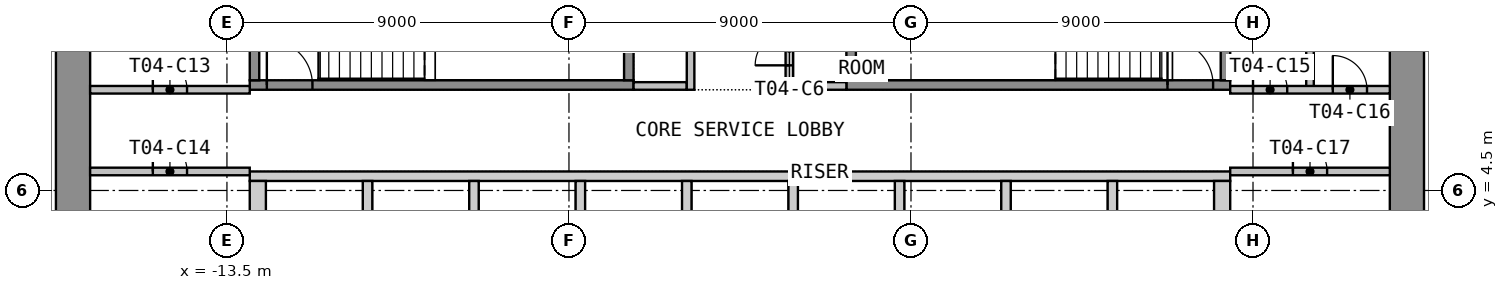
"""IFC4 building model, lengths in metres.
Left out: names, types, materials, properties, quantities, classifications, styles, units other than length and angle.
Written with IfcOpenShell. Run it as: python <this file> out.ifc"""

import sys

from ifc_helpers import new_model, si_unit, direction, frame, frame_2d, origin, place, context, subcontext, project, spatial, polyline, rectangle, outline, extrude, element, fill, save


model = new_model("IFC4")
c1 = context("Model", 3, precision=1e-05, world=origin(), true_north=direction((0.0, 1.0)))
c2 = subcontext(c1, "Body", "Model", "MODEL_VIEW")
j1 = project(units=[si_unit("LENGTHUNIT", "METRE"), si_unit("PLANEANGLEUNIT", "RADIAN")], contexts=[c1])
p1 = place(None, origin())
s1 = spatial("IfcSite", under=j1, at=p1, CompositionType="ELEMENT")
p2 = place(p1, origin())
s2 = spatial("IfcBuilding", under=s1, at=p2, CompositionType="ELEMENT")
p3 = place(p2, frame((0.0, 0.0, 65.1)))
s3 = spatial("IfcBuildingStorey", under=s2, at=p3, CompositionType="ELEMENT", Elevation=65.1)
p4 = place(p3, frame((-17.55, -12.6, 0.0), z_axis=(0.0, 0.0, 1.0), x_axis=(0.0, 1.0, 0.0)))
e1 = element("IfcWall", 1, at=p4, inside=s3, PredefinedType="SHEAR", context=c2, shape_type="SweptSolid", body=[
    extrude(rectangle(XDim=25.2, YDim=0.9, at=frame_2d((12.6, 0.0))), origin(), (0.0, 0.0, 1.0), 3.525),
])
p5 = place(p4, frame((11.4, 0.0, 0.0)))
e2 = element("IfcOpeningElement", 2, at=p5, cuts=e1, PredefinedType="OPENING", context=c2, shape_type="SweptSolid", body=[
    extrude(rectangle(XDim=2.4, YDim=2.1, at=frame_2d((1.2, 1.05))), frame((0.0, 0.46, 0.0), z_axis=(0.0, -1.0, 0.0), x_axis=(1.0, 0.0, 0.0)), (0.0, 0.0, 1.0), 0.92),
])
p6 = place(p3, frame((17.55, -12.6, 0.0), z_axis=(0.0, 0.0, 1.0), x_axis=(0.0, 1.0, 0.0)))
e3 = element("IfcWall", 3, at=p6, inside=s3, PredefinedType="SHEAR", context=c2, shape_type="SweptSolid", body=[
    extrude(rectangle(XDim=25.2, YDim=0.9, at=frame_2d((12.6, 0.0))), origin(), (0.0, 0.0, 1.0), 3.525),
])
p7 = place(p6, frame((11.4, 0.0, 0.0)))
e4 = element("IfcOpeningElement", 4, at=p7, cuts=e3, PredefinedType="OPENING", context=c2, shape_type="SweptSolid", body=[
    extrude(rectangle(XDim=2.4, YDim=2.1, at=frame_2d((1.2, 1.05))), frame((0.0, 0.46, 0.0), z_axis=(0.0, -1.0, 0.0), x_axis=(1.0, 0.0, 0.0)), (0.0, 0.0, 1.0), 0.92),
])
p8 = place(p3, origin())
e5 = element("IfcWall", 5, at=p8, inside=s3, PredefinedType="SHEAR", context=c2, shape_type="SweptSolid", body=[
    extrude(outline(polyline([(-12.9, 4.75), (12.9, 4.75), (12.9, 5.0), (-12.9, 5.0), (-12.9, 4.75)])), origin(), (0.0, 0.0, 1.0), 3.525),
])
p9 = place(p3, origin())
e6 = element("IfcWall", 6, at=p9, inside=s3, PredefinedType="SHEAR", context=c2, shape_type="SweptSolid", body=[
    extrude(outline(polyline([(-12.9, 2.05), (-12.475, 2.05), (-12.475, 4.75), (-12.9, 4.75), (-12.9, 2.05)])), origin(), (0.0, 0.0, 1.0), 3.525),
])
p10 = place(p3, origin())
e7 = element("IfcWall", 7, at=p10, inside=s3, PredefinedType="SHEAR", context=c2, shape_type="SweptSolid", body=[
    extrude(outline(polyline([(-9.925, 2.05), (-9.675, 2.05), (-9.675, 4.75), (-9.925, 4.75), (-9.925, 2.05)])), origin(), (0.0, 0.0, 1.0), 3.525),
])
p11 = place(p3, origin())
e8 = element("IfcWall", 8, at=p11, inside=s3, PredefinedType="SHEAR", context=c2, shape_type="SweptSolid", body=[
    extrude(outline(polyline([(-7.125, 2.05), (-6.875, 2.05), (-6.875, 4.75), (-7.125, 4.75), (-7.125, 2.05)])), origin(), (0.0, 0.0, 1.0), 3.525),
])
p12 = place(p3, origin())
e9 = element("IfcWall", 9, at=p12, inside=s3, PredefinedType="SHEAR", context=c2, shape_type="SweptSolid", body=[
    extrude(outline(polyline([(-4.325, 2.05), (-4.075, 2.05), (-4.075, 4.75), (-4.325, 4.75), (-4.325, 2.05)])), origin(), (0.0, 0.0, 1.0), 3.525),
])
p13 = place(p3, origin())
e10 = element("IfcWall", 10, at=p13, inside=s3, PredefinedType="SHEAR", context=c2, shape_type="SweptSolid", body=[
    extrude(outline(polyline([(-1.525, 2.05), (-1.275, 2.05), (-1.275, 4.75), (-1.525, 4.75), (-1.525, 2.05)])), origin(), (0.0, 0.0, 1.0), 3.525),
])
p14 = place(p3, origin())
e11 = element("IfcWall", 11, at=p14, inside=s3, PredefinedType="SHEAR", context=c2, shape_type="SweptSolid", body=[
    extrude(outline(polyline([(1.275, 2.05), (1.525, 2.05), (1.525, 4.75), (1.275, 4.75), (1.275, 2.05)])), origin(), (0.0, 0.0, 1.0), 3.525),
])
p15 = place(p3, origin())
e12 = element("IfcWall", 12, at=p15, inside=s3, PredefinedType="SHEAR", context=c2, shape_type="SweptSolid", body=[
    extrude(outline(polyline([(4.075, 2.05), (4.325, 2.05), (4.325, 4.75), (4.075, 4.75), (4.075, 2.05)])), origin(), (0.0, 0.0, 1.0), 3.525),
])
p16 = place(p3, origin())
e13 = element("IfcWall", 13, at=p16, inside=s3, PredefinedType="SHEAR", context=c2, shape_type="SweptSolid", body=[
    extrude(outline(polyline([(6.875, 2.05), (7.125, 2.05), (7.125, 4.75), (6.875, 4.75), (6.875, 2.05)])), origin(), (0.0, 0.0, 1.0), 3.525),
])
p17 = place(p3, origin())
e14 = element("IfcWall", 14, at=p17, inside=s3, PredefinedType="SHEAR", context=c2, shape_type="SweptSolid", body=[
    extrude(outline(polyline([(9.675, 2.05), (9.925, 2.05), (9.925, 4.75), (9.675, 4.75), (9.675, 2.05)])), origin(), (0.0, 0.0, 1.0), 3.525),
])
p18 = place(p3, origin())
e15 = element("IfcWall", 15, at=p18, inside=s3, PredefinedType="SHEAR", context=c2, shape_type="SweptSolid", body=[
    extrude(outline(polyline([(12.475, 2.05), (12.9, 2.05), (12.9, 4.75), (12.475, 4.75), (12.475, 2.05)])), origin(), (0.0, 0.0, 1.0), 3.525),
])
p19 = place(p3, frame((-12.9, 7.275, 0.0), z_axis=(0.0, 0.0, 1.0), x_axis=(1.0, 0.0, 0.0)))
e16 = element("IfcWall", 16, at=p19, inside=s3, PredefinedType="SHEAR", context=c2, shape_type="SweptSolid", body=[
    extrude(rectangle(XDim=10.1, YDim=0.25, at=frame_2d((5.05, 0.0))), origin(), (0.0, 0.0, 1.0), 3.525),
])
p20 = place(p19, frame((0.45, 0.0, 0.0)))
e17 = element("IfcOpeningElement", 17, at=p20, cuts=e16, PredefinedType="OPENING", context=c2, shape_type="SweptSolid", body=[
    extrude(rectangle(XDim=1.2, YDim=2.1, at=frame_2d((0.6, 1.05))), frame((0.0, 0.135, 0.0), z_axis=(0.0, -1.0, 0.0), x_axis=(1.0, 0.0, 0.0)), (0.0, 0.0, 1.0), 0.27),
])
for number, where, z_axis, x_axis in (
    (18, (-12.775, 7.4, 0.0), (0.0, 0.0, 1.0), (0.0, 1.0, 0.0)),
    (19, (-2.925, 7.4, 0.0), (0.0, 0.0, 1.0), (0.0, 1.0, 0.0)),
):
    element("IfcWall", number, at=place(p3, frame(where, z_axis=z_axis, x_axis=x_axis)), inside=s3, PredefinedType="SHEAR", context=c2, shape_type="SweptSolid", body=[
        extrude(rectangle(XDim=3.25, YDim=0.25, at=frame_2d((1.625, 0.0))), origin(), (0.0, 0.0, 1.0), 3.525),
    ])
p21 = place(p3, frame((2.8, 7.275, 0.0), z_axis=(0.0, 0.0, 1.0), x_axis=(1.0, 0.0, 0.0)))
e20 = element("IfcWall", 20, at=p21, inside=s3, PredefinedType="SHEAR", context=c2, shape_type="SweptSolid", body=[
    extrude(rectangle(XDim=10.1, YDim=0.25, at=frame_2d((5.05, 0.0))), origin(), (0.0, 0.0, 1.0), 3.525),
])
p22 = place(p21, frame((8.45, 0.0, 0.0)))
e21 = element("IfcOpeningElement", 21, at=p22, cuts=e20, PredefinedType="OPENING", context=c2, shape_type="SweptSolid", body=[
    extrude(rectangle(XDim=1.2, YDim=2.1, at=frame_2d((0.6, 1.05))), frame((0.0, 0.135, 0.0), z_axis=(0.0, -1.0, 0.0), x_axis=(1.0, 0.0, 0.0)), (0.0, 0.0, 1.0), 0.27),
])
for number, where, z_axis, x_axis in (
    (22, (2.925, 7.4, 0.0), (0.0, 0.0, 1.0), (0.0, 1.0, 0.0)),
    (23, (12.775, 7.4, 0.0), (0.0, 0.0, 1.0), (0.0, 1.0, 0.0)),
):
    element("IfcWall", number, at=place(p3, frame(where, z_axis=z_axis, x_axis=x_axis)), inside=s3, PredefinedType="SHEAR", context=c2, shape_type="SweptSolid", body=[
        extrude(rectangle(XDim=3.25, YDim=0.25, at=frame_2d((1.625, 0.0))), origin(), (0.0, 0.0, 1.0), 3.525),
    ])
for number, where, z_axis, x_axis in (
    (24, (-2.8, 7.25, 0.0), (0.0, 0.0, 1.0), (1.0, 0.0, 0.0)),
    (25, (1.4, 7.25, 0.0), (0.0, 0.0, 1.0), (1.0, 0.0, 0.0)),
):
    element("IfcWall", number, at=place(p3, frame(where, z_axis=z_axis, x_axis=x_axis)), inside=s3, PredefinedType="PARTITIONING", context=c2, shape_type="SweptSolid", body=[
        extrude(rectangle(XDim=1.4, YDim=0.2, at=frame_2d((0.7, 0.0))), origin(), (0.0, 0.0, 1.0), 3.525),
    ])
p23 = place(p3, frame((-1.3, 7.15, 0.0), z_axis=(0.0, 0.0, 1.0), x_axis=(0.0, 1.0, 0.0)))
e26 = element("IfcWall", 26, at=p23, inside=s3, PredefinedType="PARTITIONING", context=c2, shape_type="SweptSolid", body=[
    extrude(rectangle(XDim=5.45, YDim=0.2, at=frame_2d((2.725, 0.0))), origin(), (0.0, 0.0, 1.0), 3.525),
])
p24 = place(p23, frame((2.375, 0.0, 0.0)))
e27 = element("IfcOpeningElement", 27, at=p24, cuts=e26, PredefinedType="OPENING", context=c2, shape_type="SweptSolid", body=[
    extrude(rectangle(XDim=0.9, YDim=2.1, at=frame_2d((0.45, 1.05))), frame((0.0, 0.11, 0.0), z_axis=(0.0, -1.0, 0.0), x_axis=(1.0, 0.0, 0.0)), (0.0, 0.0, 1.0), 0.22),
])
p25 = place(p3, frame((1.3, 7.15, 0.0), z_axis=(0.0, 0.0, 1.0), x_axis=(0.0, 1.0, 0.0)))
e28 = element("IfcWall", 28, at=p25, inside=s3, PredefinedType="PARTITIONING", context=c2, shape_type="SweptSolid", body=[
    extrude(rectangle(XDim=5.45, YDim=0.2, at=frame_2d((2.725, 0.0))), origin(), (0.0, 0.0, 1.0), 3.525),
])
p26 = place(p25, frame((0.643, 0.0, 0.0)))
e29 = element("IfcOpeningElement", 29, at=p26, cuts=e28, PredefinedType="OPENING", context=c2, shape_type="SweptSolid", body=[
    extrude(rectangle(XDim=0.9, YDim=2.1, at=frame_2d((0.45, 1.05))), frame((0.0, 0.11, 0.0), z_axis=(0.0, -1.0, 0.0), x_axis=(1.0, 0.0, 0.0)), (0.0, 0.0, 1.0), 0.22),
])
p27 = place(p25, frame((2.401, 0.0, 0.0)))
e30 = element("IfcOpeningElement", 30, at=p27, cuts=e28, PredefinedType="OPENING", context=c2, shape_type="SweptSolid", body=[
    extrude(rectangle(XDim=0.9, YDim=2.1, at=frame_2d((0.45, 1.05))), frame((0.0, 0.11, 0.0), z_axis=(0.0, -1.0, 0.0), x_axis=(1.0, 0.0, 0.0)), (0.0, 0.0, 1.0), 0.22),
])
p28 = place(p25, frame((4.134, 0.0, 0.0)))
e31 = element("IfcOpeningElement", 31, at=p28, cuts=e28, PredefinedType="OPENING", context=c2, shape_type="SweptSolid", body=[
    extrude(rectangle(XDim=0.9, YDim=2.1, at=frame_2d((0.45, 1.05))), frame((0.0, 0.11, 0.0), z_axis=(0.0, -1.0, 0.0), x_axis=(1.0, 0.0, 0.0)), (0.0, 0.0, 1.0), 0.22),
])
p29 = place(p3, frame((-17.1, 7.15, 0.0), z_axis=(0.0, 0.0, 1.0), x_axis=(1.0, 0.0, 0.0)))
e32 = element("IfcWall", 32, at=p29, inside=s3, PredefinedType="PARTITIONING", context=c2, shape_type="SweptSolid", body=[
    extrude(rectangle(XDim=4.2, YDim=0.2, at=frame_2d((2.1, 0.0))), origin(), (0.0, 0.0, 1.0), 3.525),
])
p30 = place(p29, frame((1.65, 0.0, 0.0)))
e33 = element("IfcOpeningElement", 33, at=p30, cuts=e32, PredefinedType="OPENING", context=c2, shape_type="SweptSolid", body=[
    extrude(rectangle(XDim=0.9, YDim=2.1, at=frame_2d((0.45, 1.05))), frame((0.0, 0.11, 0.0), z_axis=(0.0, -1.0, 0.0), x_axis=(1.0, 0.0, 0.0)), (0.0, 0.0, 1.0), 0.22),
])
p31 = place(p3, frame((-17.1, 5.0, 0.0), z_axis=(0.0, 0.0, 1.0), x_axis=(1.0, 0.0, 0.0)))
e34 = element("IfcWall", 34, at=p31, inside=s3, PredefinedType="PARTITIONING", context=c2, shape_type="SweptSolid", body=[
    extrude(rectangle(XDim=4.2, YDim=0.2, at=frame_2d((2.1, 0.0))), origin(), (0.0, 0.0, 1.0), 3.525),
])
p32 = place(p31, frame((1.65, 0.0, 0.0)))
e35 = element("IfcOpeningElement", 35, at=p32, cuts=e34, PredefinedType="OPENING", context=c2, shape_type="SweptSolid", body=[
    extrude(rectangle(XDim=0.9, YDim=2.1, at=frame_2d((0.45, 1.05))), frame((0.0, 0.11, 0.0), z_axis=(0.0, -1.0, 0.0), x_axis=(1.0, 0.0, 0.0)), (0.0, 0.0, 1.0), 0.22),
])
p33 = place(p3, frame((15.0, 7.15, 0.0), z_axis=(0.0, 0.0, 1.0), x_axis=(0.0, 1.0, 0.0)))
e36 = element("IfcWall", 36, at=p33, inside=s3, PredefinedType="PARTITIONING", context=c2, shape_type="SweptSolid", body=[
    extrude(rectangle(XDim=5.45, YDim=0.2, at=frame_2d((2.725, 0.0))), origin(), (0.0, 0.0, 1.0), 3.525),
])
p34 = place(p3, frame((12.9, 7.15, 0.0), z_axis=(0.0, 0.0, 1.0), x_axis=(1.0, 0.0, 0.0)))
e37 = element("IfcWall", 37, at=p34, inside=s3, PredefinedType="PARTITIONING", context=c2, shape_type="SweptSolid", body=[
    extrude(rectangle(XDim=4.2, YDim=0.2, at=frame_2d((2.1, 0.0))), origin(), (0.0, 0.0, 1.0), 3.525),
])
p35 = place(p34, frame((0.6, 0.0, 0.0)))
e38 = element("IfcOpeningElement", 38, at=p35, cuts=e37, PredefinedType="OPENING", context=c2, shape_type="SweptSolid", body=[
    extrude(rectangle(XDim=0.9, YDim=2.1, at=frame_2d((0.45, 1.05))), frame((0.0, 0.11, 0.0), z_axis=(0.0, -1.0, 0.0), x_axis=(1.0, 0.0, 0.0)), (0.0, 0.0, 1.0), 0.22),
])
p36 = place(p34, frame((2.7, 0.0, 0.0)))
e39 = element("IfcOpeningElement", 39, at=p36, cuts=e37, PredefinedType="OPENING", context=c2, shape_type="SweptSolid", body=[
    extrude(rectangle(XDim=0.9, YDim=2.1, at=frame_2d((0.45, 1.05))), frame((0.0, 0.11, 0.0), z_axis=(0.0, -1.0, 0.0), x_axis=(1.0, 0.0, 0.0)), (0.0, 0.0, 1.0), 0.22),
])
p37 = place(p3, frame((12.9, 5.0, 0.0), z_axis=(0.0, 0.0, 1.0), x_axis=(1.0, 0.0, 0.0)))
e40 = element("IfcWall", 40, at=p37, inside=s3, PredefinedType="PARTITIONING", context=c2, shape_type="SweptSolid", body=[
    extrude(rectangle(XDim=4.2, YDim=0.2, at=frame_2d((2.1, 0.0))), origin(), (0.0, 0.0, 1.0), 3.525),
])
p38 = place(p37, frame((1.65, 0.0, 0.0)))
e41 = element("IfcOpeningElement", 41, at=p38, cuts=e40, PredefinedType="OPENING", context=c2, shape_type="SweptSolid", body=[
    extrude(rectangle(XDim=0.9, YDim=2.1, at=frame_2d((0.45, 1.05))), frame((0.0, 0.11, 0.0), z_axis=(0.0, -1.0, 0.0), x_axis=(1.0, 0.0, 0.0)), (0.0, 0.0, 1.0), 0.22),
])
p39 = place(p20, origin())
e42 = element("IfcDoor", 42, at=p39, inside=s3, OperationType="SINGLE_SWING_LEFT", PredefinedType="DOOR", context=c2, shape_type="SweptSolid", body=[
    extrude(rectangle(XDim=1.2, YDim=2.1, at=frame_2d((0.6, 1.05))), frame((0.0, 0.025, 0.0), z_axis=(0.0, -1.0, 0.0), x_axis=(1.0, 0.0, 0.0)), (0.0, 0.0, 1.0), 0.05),
])
fill(e17, e42)
p40 = place(p22, origin())
e43 = element("IfcDoor", 43, at=p40, inside=s3, OperationType="SINGLE_SWING_LEFT", PredefinedType="DOOR", context=c2, shape_type="SweptSolid", body=[
    extrude(rectangle(XDim=1.2, YDim=2.1, at=frame_2d((0.6, 1.05))), frame((0.0, 0.025, 0.0), z_axis=(0.0, -1.0, 0.0), x_axis=(1.0, 0.0, 0.0)), (0.0, 0.0, 1.0), 0.05),
])
fill(e21, e43)
p41 = place(p26, origin())
e44 = element("IfcDoor", 44, at=p41, inside=s3, OperationType="SINGLE_SWING_LEFT", PredefinedType="DOOR", context=c2, shape_type="SweptSolid", body=[
    extrude(rectangle(XDim=0.9, YDim=2.1, at=frame_2d((0.45, 1.05))), frame((0.0, 0.025, 0.0), z_axis=(0.0, -1.0, 0.0), x_axis=(1.0, 0.0, 0.0)), (0.0, 0.0, 1.0), 0.05),
])
fill(e29, e44)
p42 = place(p30, origin())
e45 = element("IfcDoor", 45, at=p42, inside=s3, OperationType="SINGLE_SWING_LEFT", PredefinedType="DOOR", context=c2, shape_type="SweptSolid", body=[
    extrude(rectangle(XDim=0.9, YDim=2.1, at=frame_2d((0.45, 1.05))), frame((0.0, 0.025, 0.0), z_axis=(0.0, -1.0, 0.0), x_axis=(1.0, 0.0, 0.0)), (0.0, 0.0, 1.0), 0.05),
])
fill(e33, e45)
p43 = place(p32, origin())
e46 = element("IfcDoor", 46, at=p43, inside=s3, OperationType="SINGLE_SWING_LEFT", PredefinedType="DOOR", context=c2, shape_type="SweptSolid", body=[
    extrude(rectangle(XDim=0.9, YDim=2.1, at=frame_2d((0.45, 1.05))), frame((0.0, 0.025, 0.0), z_axis=(0.0, -1.0, 0.0), x_axis=(1.0, 0.0, 0.0)), (0.0, 0.0, 1.0), 0.05),
])
fill(e35, e46)
p44 = place(p35, origin())
e47 = element("IfcDoor", 47, at=p44, inside=s3, OperationType="SINGLE_SWING_LEFT", PredefinedType="DOOR", context=c2, shape_type="SweptSolid", body=[
    extrude(rectangle(XDim=0.9, YDim=2.1, at=frame_2d((0.45, 1.05))), frame((0.0, 0.025, 0.0), z_axis=(0.0, -1.0, 0.0), x_axis=(1.0, 0.0, 0.0)), (0.0, 0.0, 1.0), 0.05),
])
fill(e38, e47)
p45 = place(p36, origin())
e48 = element("IfcDoor", 48, at=p45, inside=s3, OperationType="SINGLE_SWING_LEFT", PredefinedType="DOOR", context=c2, shape_type="SweptSolid", body=[
    extrude(rectangle(XDim=0.9, YDim=2.1, at=frame_2d((0.45, 1.05))), frame((0.0, 0.025, 0.0), z_axis=(0.0, -1.0, 0.0), x_axis=(1.0, 0.0, 0.0)), (0.0, 0.0, 1.0), 0.05),
])
fill(e39, e48)
p46 = place(p38, origin())
e49 = element("IfcDoor", 49, at=p46, inside=s3, OperationType="SINGLE_SWING_LEFT", PredefinedType="DOOR", context=c2, shape_type="SweptSolid", body=[
    extrude(rectangle(XDim=0.9, YDim=2.1, at=frame_2d((0.45, 1.05))), frame((0.0, 0.025, 0.0), z_axis=(0.0, -1.0, 0.0), x_axis=(1.0, 0.0, 0.0)), (0.0, 0.0, 1.0), 0.05),
])
fill(e41, e49)
save(model, sys.argv[1])
